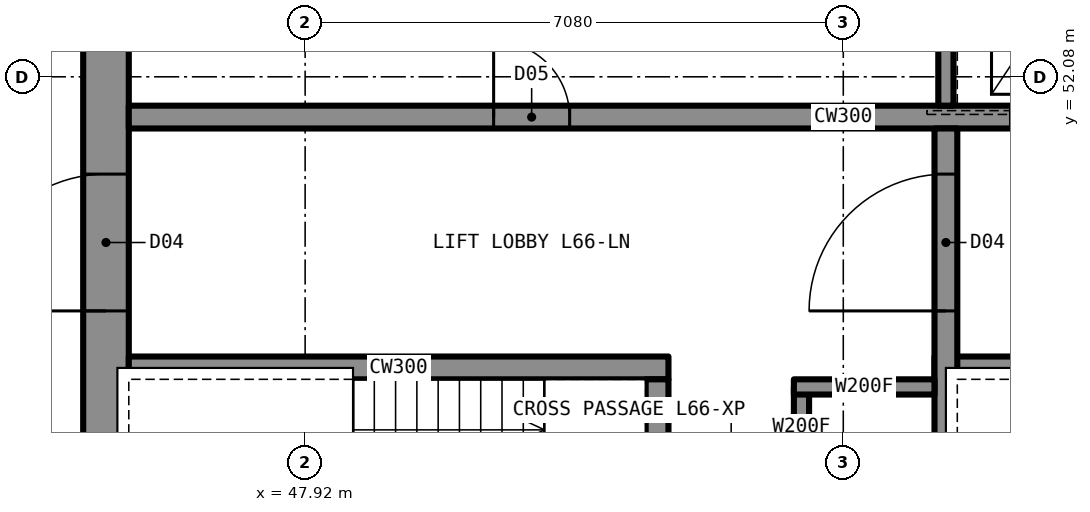
"""IFC4 building model, lengths in metres.
Left out: names, types, materials, properties, quantities, classifications, styles, units other than length and angle.
Written with IfcOpenShell. Run it as: python <this file> out.ifc"""

import sys

from ifc_helpers import new_model, si_unit, direction, frame, frame_2d, origin, place, context, subcontext, project, spatial, rectangle, extrude, element, fill, save


model = new_model("IFC4")
c1 = context("Model", 3, precision=1e-05, world=origin(), true_north=direction((0.0, 1.0)))
c2 = subcontext(c1, "Body", "Model", "MODEL_VIEW")
j1 = project(units=[si_unit("LENGTHUNIT", "METRE"), si_unit("PLANEANGLEUNIT", "RADIAN")], contexts=[c1])
p1 = place(None, origin())
s1 = spatial("IfcSite", under=j1, at=p1, CompositionType="ELEMENT")
p2 = place(p1, origin())
s2 = spatial("IfcBuilding", under=s1, at=p2, CompositionType="ELEMENT")
p3 = place(p2, frame((0.0, 0.0, 237.2)))
s3 = spatial("IfcBuildingStorey", under=s2, at=p3, CompositionType="ELEMENT", Elevation=237.2)
p4 = place(p3, frame((45.3, 35.6, 0.0), z_axis=(0.0, 0.0, 1.0), x_axis=(0.0, 1.0, 0.0)))
e1 = element("IfcWall", 1, at=p4, inside=s3, PredefinedType="SHEAR", context=c2, shape_type="SweptSolid", body=[
    extrude(rectangle(XDim=18.8, YDim=0.6, at=frame_2d((9.4, 0.0))), origin(), (0.0, 0.0, 1.0), 3.5),
])
p5 = place(p4, frame((13.4, 0.0, 0.0)))
e2 = element("IfcOpeningElement", 2, at=p5, cuts=e1, PredefinedType="OPENING", context=c2, shape_type="SweptSolid", body=[
    extrude(rectangle(XDim=1.8, YDim=2.2, at=frame_2d((0.9, 1.1))), frame((0.0, 0.31, 0.0), z_axis=(0.0, -1.0, 0.0), x_axis=(1.0, 0.0, 0.0)), (0.0, 0.0, 1.0), 0.62),
])
p6 = place(p4, frame((3.6, 0.0, 0.0)))
e3 = element("IfcOpeningElement", 3, at=p6, cuts=e1, PredefinedType="OPENING", context=c2, shape_type="SweptSolid", body=[
    extrude(rectangle(XDim=1.8, YDim=2.2, at=frame_2d((0.9, 1.1))), frame((0.0, 0.31, 0.0), z_axis=(0.0, -1.0, 0.0), x_axis=(1.0, 0.0, 0.0)), (0.0, 0.0, 1.0), 0.62),
])
p7 = place(p4, frame((6.4, 0.0, 0.0)))
e4 = element("IfcOpeningElement", 4, at=p7, cuts=e1, PredefinedType="OPENING", context=c2, shape_type="SweptSolid", body=[
    extrude(rectangle(XDim=1.2, YDim=2.2, at=frame_2d((0.6, 1.1))), frame((0.0, 0.31, 0.0), z_axis=(0.0, -1.0, 0.0), x_axis=(1.0, 0.0, 0.0)), (0.0, 0.0, 1.0), 0.62),
])
p8 = place(p3, frame((45.6, 51.55, 0.0), z_axis=(0.0, 0.0, 1.0), x_axis=(1.0, 0.0, 0.0)))
e5 = element("IfcWall", 5, at=p8, inside=s3, PredefinedType="SHEAR", context=c2, shape_type="SweptSolid", body=[
    extrude(rectangle(XDim=18.8, YDim=0.3, at=frame_2d((9.4, 0.0))), origin(), (0.0, 0.0, 1.0), 3.5),
])
p9 = place(p8, frame((4.8, 0.0, 0.0)))
e6 = element("IfcOpeningElement", 6, at=p9, cuts=e5, PredefinedType="OPENING", context=c2, shape_type="SweptSolid", body=[
    extrude(rectangle(XDim=1.0, YDim=2.1, at=frame_2d((0.5, 1.05))), frame((0.0, 0.16, 0.0), z_axis=(0.0, -1.0, 0.0), x_axis=(1.0, 0.0, 0.0)), (0.0, 0.0, 1.0), 0.32),
])
p10 = place(p8, frame((11.6, 0.0, 0.0)))
e7 = element("IfcOpeningElement", 7, at=p10, cuts=e5, PredefinedType="OPENING", context=c2, shape_type="SweptSolid", body=[
    extrude(rectangle(XDim=1.1, YDim=2.2, at=frame_2d((0.55, 1.1))), frame((0.0, 0.16, 0.0), z_axis=(0.0, -1.0, 0.0), x_axis=(1.0, 0.0, 0.0)), (0.0, 0.0, 1.0), 0.32),
])
p11 = place(p8, frame((14.3, 0.0, 0.0)))
e8 = element("IfcOpeningElement", 8, at=p11, cuts=e5, PredefinedType="OPENING", context=c2, shape_type="SweptSolid", body=[
    extrude(rectangle(XDim=1.1, YDim=2.2, at=frame_2d((0.55, 1.1))), frame((0.0, 0.16, 0.0), z_axis=(0.0, -1.0, 0.0), x_axis=(1.0, 0.0, 0.0)), (0.0, 0.0, 1.0), 0.32),
])
p12 = place(p3, frame((45.6, 48.25, 0.0), z_axis=(0.0, 0.0, 1.0), x_axis=(1.0, 0.0, 0.0)))
e9 = element("IfcWall", 9, at=p12, inside=s3, PredefinedType="SHEAR", context=c2, shape_type="SweptSolid", body=[
    extrude(rectangle(XDim=7.1, YDim=0.3, at=frame_2d((3.55, 0.0))), origin(), (0.0, 0.0, 1.0), 3.5),
])
p13 = place(p3, frame((56.2, 48.25, 0.0), z_axis=(0.0, 0.0, 1.0), x_axis=(1.0, 0.0, 0.0)))
e10 = element("IfcWall", 10, at=p13, inside=s3, PredefinedType="SHEAR", context=c2, shape_type="SweptSolid", body=[
    extrude(rectangle(XDim=8.2, YDim=0.3, at=frame_2d((4.1, 0.0))), origin(), (0.0, 0.0, 1.0), 3.5),
])
p14 = place(p13, frame((6.95, 0.0, 0.0)))
e11 = element("IfcOpeningElement", 11, at=p14, cuts=e10, PredefinedType="OPENING", context=c2, shape_type="SweptSolid", body=[
    extrude(rectangle(XDim=1.2, YDim=2.2, at=frame_2d((0.6, 1.1))), frame((0.0, 0.16, 0.0), z_axis=(0.0, -1.0, 0.0), x_axis=(1.0, 0.0, 0.0)), (0.0, 0.0, 1.0), 0.32),
])
p15 = place(p3, frame((52.55, 41.9, 0.0), z_axis=(0.0, 0.0, 1.0), x_axis=(0.0, 1.0, 0.0)))
e12 = element("IfcWall", 12, at=p15, inside=s3, PredefinedType="SHEAR", context=c2, shape_type="SweptSolid", body=[
    extrude(rectangle(XDim=6.2, YDim=0.3, at=frame_2d((3.1, 0.0))), origin(), (0.0, 0.0, 1.0), 3.5),
])
p16 = place(p15, frame((4.125, 0.0, 0.0)))
e13 = element("IfcOpeningElement", 13, at=p16, cuts=e12, PredefinedType="OPENING", context=c2, shape_type="SweptSolid", body=[
    extrude(rectangle(XDim=1.2, YDim=2.2, at=frame_2d((0.6, 1.1))), frame((0.0, 0.16, 0.0), z_axis=(0.0, -1.0, 0.0), x_axis=(1.0, 0.0, 0.0)), (0.0, 0.0, 1.0), 0.32),
])
p17 = place(p3, frame((56.35, 41.9, 0.0), z_axis=(0.0, 0.0, 1.0), x_axis=(0.0, 1.0, 0.0)))
e14 = element("IfcWall", 14, at=p17, inside=s3, PredefinedType="SHEAR", context=c2, shape_type="SweptSolid", body=[
    extrude(rectangle(XDim=9.5, YDim=0.3, at=frame_2d((4.75, 0.0))), origin(), (0.0, 0.0, 1.0), 3.5),
])
p18 = place(p17, frame((7.1, 0.0, 0.0)))
e15 = element("IfcOpeningElement", 15, at=p18, cuts=e14, PredefinedType="OPENING", context=c2, shape_type="SweptSolid", body=[
    extrude(rectangle(XDim=1.8, YDim=2.2, at=frame_2d((0.9, 1.1))), frame((0.0, 0.16, 0.0), z_axis=(0.0, -1.0, 0.0), x_axis=(1.0, 0.0, 0.0)), (0.0, 0.0, 1.0), 0.32),
])
p19 = place(p3, frame((56.35, 51.7, 0.0), z_axis=(0.0, 0.0, 1.0), x_axis=(0.0, 1.0, 0.0)))
e16 = element("IfcWall", 16, at=p19, inside=s3, PredefinedType="PARTITIONING", context=c2, shape_type="SweptSolid", body=[
    extrude(rectangle(XDim=2.7, YDim=0.2, at=frame_2d((1.35, 0.0))), origin(), (0.0, 0.0, 1.0), 3.33),
])
p20 = place(p5, origin())
e17 = element("IfcDoor", 17, at=p20, inside=s3, OperationType="DOUBLE_DOOR_SINGLE_SWING", PredefinedType="DOOR", context=c2, shape_type="SweptSolid", body=[
    extrude(rectangle(XDim=1.8, YDim=2.2, at=frame_2d((0.9, 1.1))), frame((0.0, 0.025, 0.0), z_axis=(0.0, -1.0, 0.0), x_axis=(1.0, 0.0, 0.0)), (0.0, 0.0, 1.0), 0.05),
])
fill(e2, e17)
p21 = place(p18, origin())
e18 = element("IfcDoor", 18, at=p21, inside=s3, OperationType="DOUBLE_DOOR_SINGLE_SWING", PredefinedType="DOOR", context=c2, shape_type="SweptSolid", body=[
    extrude(rectangle(XDim=1.8, YDim=2.2, at=frame_2d((0.9, 1.1))), frame((0.0, 0.025, 0.0), z_axis=(0.0, -1.0, 0.0), x_axis=(1.0, 0.0, 0.0)), (0.0, 0.0, 1.0), 0.05),
])
fill(e15, e18)
p22 = place(p9, origin())
e19 = element("IfcDoor", 19, at=p22, inside=s3, OperationType="SINGLE_SWING_LEFT", PredefinedType="DOOR", context=c2, shape_type="SweptSolid", body=[
    extrude(rectangle(XDim=1.0, YDim=2.1, at=frame_2d((0.5, 1.05))), frame((0.0, 0.025, 0.0), z_axis=(0.0, -1.0, 0.0), x_axis=(1.0, 0.0, 0.0)), (0.0, 0.0, 1.0), 0.05),
])
fill(e6, e19)
save(model, sys.argv[1])
